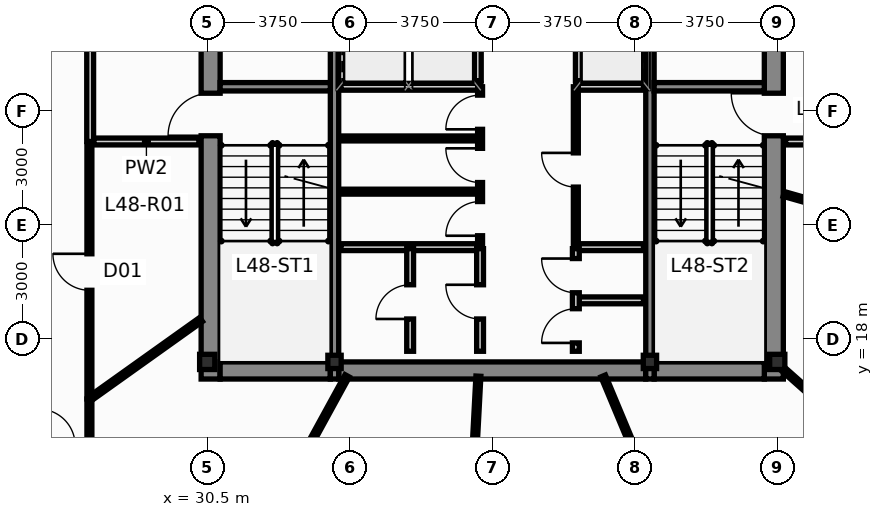
"""IFC4 building model, lengths in metres.
Left out: names, types, materials, properties, quantities, classifications, styles, units other than length and angle.
Written with IfcOpenShell. Run it as: python <this file> out.ifc"""

import sys

from ifc_helpers import new_model, si_unit, direction, frame, frame_2d, origin, origin_2d, place, context, subcontext, project, spatial, rectangle, hollow_rectangle, i_section, extrude, source, transform, mapped, element, fill, save


model = new_model("IFC4")
c1 = context("Model", 3, precision=1e-05, world=origin(), true_north=direction((0.0, 1.0)))
c2 = subcontext(c1, "Body", "Model", "MODEL_VIEW")
j1 = project(units=[si_unit("LENGTHUNIT", "METRE"), si_unit("PLANEANGLEUNIT", "RADIAN")], contexts=[c1])
p1 = place(None, origin())
s1 = spatial("IfcSite", under=j1, at=p1, CompositionType="ELEMENT")
p2 = place(p1, origin())
s2 = spatial("IfcBuilding", under=s1, at=p2, CompositionType="ELEMENT")
p3 = place(p2, frame((0.0, 0.0, 184.05)))
s3 = spatial("IfcBuildingStorey", under=s2, at=p3, CompositionType="ELEMENT", Elevation=184.05)
m1 = source(origin(), c2, "Body", "SweptSolid", [
    extrude(i_section(OverallWidth=0.4, OverallDepth=0.4, WebThickness=0.02, FlangeThickness=0.032, at=origin_2d()), origin(), (0.0, 0.0, 1.0), 3.65),
])
for number, where, z_axis, x_axis in (
    (1, (30.5, 17.4, 0.0), (0.0, 0.0, 1.0), (1.0, 0.0, 0.0)),
    (2, (45.5, 17.4, 0.0), (0.0, 0.0, 1.0), (1.0, 0.0, 0.0)),
):
    element("IfcColumn", number, at=place(p3, frame(where, z_axis=z_axis, x_axis=x_axis)), inside=s3, PredefinedType="COLUMN", context=c2, shape_type="MappedRepresentation", body=[
        mapped(m1, transform((0.0, 0.0, 0.0), scale=1.0)),
    ])
m2 = source(origin(), c2, "Body", "SweptSolid", [
    extrude(hollow_rectangle(XDim=0.35, YDim=0.35, WallThickness=0.016, at=origin_2d()), origin(), (0.0, 0.0, 1.0), 3.65),
])
for number, where, z_axis, x_axis in (
    (3, (33.85, 17.4, 0.0), (0.0, 0.0, 1.0), (1.0, 0.0, 0.0)),
    (4, (42.15, 17.4, 0.0), (0.0, 0.0, 1.0), (1.0, 0.0, 0.0)),
):
    element("IfcColumn", number, at=place(p3, frame(where, z_axis=z_axis, x_axis=x_axis)), inside=s3, PredefinedType="COLUMN", context=c2, shape_type="MappedRepresentation", body=[
        mapped(m2, transform((0.0, 0.0, 0.0), scale=1.0)),
    ])
p4 = place(p3, frame((30.59, 16.95, 0.0), z_axis=(0.0, 0.0, 1.0), x_axis=(0.0, 1.0, 0.0)))
e5 = element("IfcWall", 5, at=p4, inside=s3, PredefinedType="SHEAR", context=c2, shape_type="SweptSolid", body=[
    extrude(rectangle(XDim=13.275, YDim=0.5, at=frame_2d((6.638, 0.0))), origin(), (0.0, 0.0, 1.0), 3.65),
])
p5 = place(p4, frame((6.4, 0.0, 0.0)))
e6 = element("IfcOpeningElement", 6, at=p5, cuts=e5, PredefinedType="OPENING", context=c2, shape_type="SweptSolid", body=[
    extrude(rectangle(XDim=1.12, YDim=2.15, at=frame_2d((0.56, 1.075))), frame((0.0, 0.262, 0.0), z_axis=(0.0, -1.0, 0.0), x_axis=(1.0, 0.0, 0.0)), (0.0, 0.0, 1.0), 0.524),
])
p6 = place(p4, frame((10.85, 0.0, 0.0)))
e7 = element("IfcOpeningElement", 7, at=p6, cuts=e5, PredefinedType="OPENING", context=c2, shape_type="SweptSolid", body=[
    extrude(rectangle(XDim=1.2, YDim=2.2, at=frame_2d((0.6, 1.1))), frame((0.0, 0.262, 0.0), z_axis=(0.0, -1.0, 0.0), x_axis=(1.0, 0.0, 0.0)), (0.0, 0.0, 1.0), 0.524),
])
p7 = place(p3, frame((45.41, 16.95, 0.0), z_axis=(0.0, 0.0, 1.0), x_axis=(0.0, 1.0, 0.0)))
e8 = element("IfcWall", 8, at=p7, inside=s3, PredefinedType="SHEAR", context=c2, shape_type="SweptSolid", body=[
    extrude(rectangle(XDim=13.275, YDim=0.5, at=frame_2d((6.638, 0.0))), origin(), (0.0, 0.0, 1.0), 3.65),
])
p8 = place(p7, frame((6.4, 0.0, 0.0)))
e9 = element("IfcOpeningElement", 9, at=p8, cuts=e8, PredefinedType="OPENING", context=c2, shape_type="SweptSolid", body=[
    extrude(rectangle(XDim=1.12, YDim=2.15, at=frame_2d((0.56, 1.075))), frame((0.0, 0.262, 0.0), z_axis=(0.0, -1.0, 0.0), x_axis=(1.0, 0.0, 0.0)), (0.0, 0.0, 1.0), 0.524),
])
p9 = place(p7, frame((10.85, 0.0, 0.0)))
e10 = element("IfcOpeningElement", 10, at=p9, cuts=e8, PredefinedType="OPENING", context=c2, shape_type="SweptSolid", body=[
    extrude(rectangle(XDim=1.2, YDim=2.2, at=frame_2d((0.6, 1.1))), frame((0.0, 0.262, 0.0), z_axis=(0.0, -1.0, 0.0), x_axis=(1.0, 0.0, 0.0)), (0.0, 0.0, 1.0), 0.524),
])
p10 = place(p3, frame((30.84, 17.175, 0.0), z_axis=(0.0, 0.0, 1.0), x_axis=(1.0, 0.0, 0.0)))
e11 = element("IfcWall", 11, at=p10, inside=s3, PredefinedType="SHEAR", context=c2, shape_type="SweptSolid", body=[
    extrude(rectangle(XDim=2.9, YDim=0.45, at=frame_2d((1.45, 0.0))), origin(), (0.0, 0.0, 1.0), 3.65),
])
p11 = place(p3, frame((33.96, 17.175, 0.0), z_axis=(0.0, 0.0, 1.0), x_axis=(1.0, 0.0, 0.0)))
e12 = element("IfcWall", 12, at=p11, inside=s3, PredefinedType="SHEAR", context=c2, shape_type="SweptSolid", body=[
    extrude(rectangle(XDim=8.08, YDim=0.45, at=frame_2d((4.04, 0.0))), origin(), (0.0, 0.0, 1.0), 3.65),
])
p12 = place(p3, frame((42.26, 17.175, 0.0), z_axis=(0.0, 0.0, 1.0), x_axis=(1.0, 0.0, 0.0)))
e13 = element("IfcWall", 13, at=p12, inside=s3, PredefinedType="SHEAR", context=c2, shape_type="SweptSolid", body=[
    extrude(rectangle(XDim=2.9, YDim=0.45, at=frame_2d((1.45, 0.0))), origin(), (0.0, 0.0, 1.0), 3.65),
])
for number, where, z_axis, x_axis in (
    (14, (33.85, 16.95, 0.0), (0.0, 0.0, 1.0), (0.0, 1.0, 0.0)),
    (15, (42.15, 16.95, 0.0), (0.0, 0.0, 1.0), (0.0, 1.0, 0.0)),
):
    element("IfcWall", number, at=place(p3, frame(where, z_axis=z_axis, x_axis=x_axis)), inside=s3, PredefinedType="SHEAR", context=c2, shape_type="SweptSolid", body=[
        extrude(rectangle(XDim=13.275, YDim=0.22, at=frame_2d((6.638, 0.0))), origin(), (0.0, 0.0, 1.0), 3.65),
    ])
for number, where, z_axis, x_axis in (
    (16, (30.84, 24.64, 0.0), (0.0, 0.0, 1.0), (1.0, 0.0, 0.0)),
    (17, (42.26, 24.64, 0.0), (0.0, 0.0, 1.0), (1.0, 0.0, 0.0)),
):
    element("IfcWall", number, at=place(p3, frame(where, z_axis=z_axis, x_axis=x_axis)), inside=s3, PredefinedType="SHEAR", context=c2, shape_type="SweptSolid", body=[
        extrude(rectangle(XDim=2.9, YDim=0.22, at=frame_2d((1.45, 0.0))), origin(), (0.0, 0.0, 1.0), 3.65),
    ])
for number, where, z_axis, x_axis in (
    (18, (37.62, 24.8, 0.0), (0.0, 0.0, 1.0), (0.0, 1.0, 0.0)),
    (19, (40.28, 24.8, 0.0), (0.0, 0.0, 1.0), (0.0, 1.0, 0.0)),
):
    element("IfcWall", number, at=place(p3, frame(where, z_axis=z_axis, x_axis=x_axis)), inside=s3, PredefinedType="PARTITIONING", context=c2, shape_type="SweptSolid", body=[
        extrude(rectangle(XDim=2.0, YDim=0.18, at=frame_2d((1.0, 0.0))), origin(), (0.0, 0.0, 1.0), 3.4),
    ])
p13 = place(p3, frame((34.02, 24.64, 0.0), z_axis=(0.0, 0.0, 1.0), x_axis=(1.0, 0.0, 0.0)))
e20 = element("IfcWall", 20, at=p13, inside=s3, PredefinedType="PARTITIONING", context=c2, shape_type="SweptSolid", body=[
    extrude(rectangle(XDim=3.68, YDim=0.18, at=frame_2d((1.84, 0.0))), origin(), (0.0, 0.0, 1.0), 3.4),
])
p14 = place(p3, frame((40.2, 24.64, 0.0), z_axis=(0.0, 0.0, 1.0), x_axis=(1.0, 0.0, 0.0)))
e21 = element("IfcWall", 21, at=p14, inside=s3, PredefinedType="PARTITIONING", context=c2, shape_type="SweptSolid", body=[
    extrude(rectangle(XDim=1.78, YDim=0.18, at=frame_2d((0.89, 0.0))), origin(), (0.0, 0.0, 1.0), 3.4),
])
p15 = place(p3, frame((27.42, 23.2, 0.0), z_axis=(0.0, 0.0, 1.0), x_axis=(0.0, 1.0, 0.0)))
e22 = element("IfcWall", 22, at=p15, inside=s3, PredefinedType="PARTITIONING", context=c2, shape_type="SweptSolid", body=[
    extrude(rectangle(XDim=6.4, YDim=0.18, at=frame_2d((3.2, 0.0))), origin(), (0.0, 0.0, 1.0), 3.078),
])
p16 = place(p15, frame((2.65, 0.0, 0.0)))
e23 = element("IfcOpeningElement", 23, at=p16, cuts=e22, PredefinedType="OPENING", context=c2, shape_type="SweptSolid", body=[
    extrude(rectangle(XDim=1.05, YDim=2.15, at=frame_2d((0.525, 1.075))), frame((0.0, 0.102, 0.0), z_axis=(0.0, -1.0, 0.0), x_axis=(1.0, 0.0, 0.0)), (0.0, 0.0, 1.0), 0.204),
])
for number, where, z_axis, x_axis in (
    (24, (27.52, 23.2, 0.0), (0.0, 0.0, 1.0), (1.0, 0.0, 0.0)),
    (25, (45.72, 23.2, 0.0), (0.0, 0.0, 1.0), (1.0, 0.0, 0.0)),
):
    element("IfcWall", number, at=place(p3, frame(where, z_axis=z_axis, x_axis=x_axis)), inside=s3, PredefinedType="PARTITIONING", context=c2, shape_type="SweptSolid", body=[
        extrude(rectangle(XDim=2.76, YDim=0.18, at=frame_2d((1.38, 0.0))), origin(), (0.0, 0.0, 1.0), 3.4),
    ])
p17 = place(p3, frame((34.02, 20.42, 0.0), z_axis=(0.0, 0.0, 1.0), x_axis=(1.0, 0.0, 0.0)))
e26 = element("IfcWall", 26, at=p17, inside=s3, PredefinedType="PARTITIONING", context=c2, shape_type="SweptSolid", body=[
    extrude(rectangle(XDim=3.64, YDim=0.18, at=frame_2d((1.82, 0.0))), origin(), (0.0, 0.0, 1.0), 3.4),
])
p18 = place(p3, frame((40.22, 20.42, 0.0), z_axis=(0.0, 0.0, 1.0), x_axis=(1.0, 0.0, 0.0)))
e27 = element("IfcWall", 27, at=p18, inside=s3, PredefinedType="PARTITIONING", context=c2, shape_type="SweptSolid", body=[
    extrude(rectangle(XDim=1.76, YDim=0.18, at=frame_2d((0.88, 0.0))), origin(), (0.0, 0.0, 1.0), 3.4),
])
for number, where, z_axis, x_axis in (
    (28, (34.02, 21.88, 0.0), (0.0, 0.0, 1.0), (1.0, 0.0, 0.0)),
    (29, (34.02, 23.28, 0.0), (0.0, 0.0, 1.0), (1.0, 0.0, 0.0)),
):
    element("IfcWall", number, at=place(p3, frame(where, z_axis=z_axis, x_axis=x_axis)), inside=s3, PredefinedType="PARTITIONING", context=c2, shape_type="SweptSolid", body=[
        extrude(rectangle(XDim=3.58, YDim=0.13, at=frame_2d((1.79, 0.0))), origin(), (0.0, 0.0, 1.0), 3.4),
    ])
p19 = place(p3, frame((37.68, 20.5, 0.0), z_axis=(0.0, 0.0, 1.0), x_axis=(0.0, 1.0, 0.0)))
e30 = element("IfcWall", 30, at=p19, inside=s3, PredefinedType="PARTITIONING", context=c2, shape_type="SweptSolid", body=[
    extrude(rectangle(XDim=4.14, YDim=0.13, at=frame_2d((2.07, 0.0))), origin(), (0.0, 0.0, 1.0), 3.4),
])
p20 = place(p19, frame((0.22, 0.0, 0.0)))
e31 = element("IfcOpeningElement", 31, at=p20, cuts=e30, PredefinedType="OPENING", context=c2, shape_type="SweptSolid", body=[
    extrude(rectangle(XDim=0.9, YDim=2.1, at=frame_2d((0.45, 1.05))), frame((0.0, 0.077, 0.0), z_axis=(0.0, -1.0, 0.0), x_axis=(1.0, 0.0, 0.0)), (0.0, 0.0, 1.0), 0.154),
])
p21 = place(p19, frame((1.62, 0.0, 0.0)))
e32 = element("IfcOpeningElement", 32, at=p21, cuts=e30, PredefinedType="OPENING", context=c2, shape_type="SweptSolid", body=[
    extrude(rectangle(XDim=0.9, YDim=2.1, at=frame_2d((0.45, 1.05))), frame((0.0, 0.077, 0.0), z_axis=(0.0, -1.0, 0.0), x_axis=(1.0, 0.0, 0.0)), (0.0, 0.0, 1.0), 0.154),
])
p22 = place(p19, frame((3.02, 0.0, 0.0)))
e33 = element("IfcOpeningElement", 33, at=p22, cuts=e30, PredefinedType="OPENING", context=c2, shape_type="SweptSolid", body=[
    extrude(rectangle(XDim=0.9, YDim=2.1, at=frame_2d((0.45, 1.05))), frame((0.0, 0.077, 0.0), z_axis=(0.0, -1.0, 0.0), x_axis=(1.0, 0.0, 0.0)), (0.0, 0.0, 1.0), 0.154),
])
p23 = place(p3, frame((40.2, 20.5, 0.0), z_axis=(0.0, 0.0, 1.0), x_axis=(0.0, 1.0, 0.0)))
e34 = element("IfcWall", 34, at=p23, inside=s3, PredefinedType="PARTITIONING", context=c2, shape_type="SweptSolid", body=[
    extrude(rectangle(XDim=4.14, YDim=0.13, at=frame_2d((2.07, 0.0))), origin(), (0.0, 0.0, 1.0), 3.4),
])
p24 = place(p23, frame((1.5, 0.0, 0.0)))
e35 = element("IfcOpeningElement", 35, at=p24, cuts=e34, PredefinedType="OPENING", context=c2, shape_type="SweptSolid", body=[
    extrude(rectangle(XDim=0.9, YDim=2.1, at=frame_2d((0.45, 1.05))), frame((0.0, 0.077, 0.0), z_axis=(0.0, -1.0, 0.0), x_axis=(1.0, 0.0, 0.0)), (0.0, 0.0, 1.0), 0.154),
])
p25 = place(p3, frame((35.84, 17.68, 0.0), z_axis=(0.0, 0.0, 1.0), x_axis=(0.0, 1.0, 0.0)))
e36 = element("IfcWall", 36, at=p25, inside=s3, PredefinedType="PARTITIONING", context=c2, shape_type="SweptSolid", body=[
    extrude(rectangle(XDim=2.7, YDim=0.18, at=frame_2d((1.35, 0.0))), origin(), (0.0, 0.0, 1.0), 3.4),
])
p26 = place(p25, frame((0.85, 0.0, 0.0)))
e37 = element("IfcOpeningElement", 37, at=p26, cuts=e36, PredefinedType="OPENING", context=c2, shape_type="SweptSolid", body=[
    extrude(rectangle(XDim=0.9, YDim=2.1, at=frame_2d((0.45, 1.05))), frame((0.0, 0.102, 0.0), z_axis=(0.0, -1.0, 0.0), x_axis=(1.0, 0.0, 0.0)), (0.0, 0.0, 1.0), 0.204),
])
p27 = place(p3, frame((37.68, 17.68, 0.0), z_axis=(0.0, 0.0, 1.0), x_axis=(0.0, 1.0, 0.0)))
e38 = element("IfcWall", 38, at=p27, inside=s3, PredefinedType="PARTITIONING", context=c2, shape_type="SweptSolid", body=[
    extrude(rectangle(XDim=2.7, YDim=0.18, at=frame_2d((1.35, 0.0))), origin(), (0.0, 0.0, 1.0), 3.4),
])
p28 = place(p27, frame((0.85, 0.0, 0.0)))
e39 = element("IfcOpeningElement", 39, at=p28, cuts=e38, PredefinedType="OPENING", context=c2, shape_type="SweptSolid", body=[
    extrude(rectangle(XDim=0.9, YDim=2.1, at=frame_2d((0.45, 1.05))), frame((0.0, 0.102, 0.0), z_axis=(0.0, -1.0, 0.0), x_axis=(1.0, 0.0, 0.0)), (0.0, 0.0, 1.0), 0.204),
])
p29 = place(p3, frame((40.28, 19.02, 0.0), z_axis=(0.0, 0.0, 1.0), x_axis=(1.0, 0.0, 0.0)))
e40 = element("IfcWall", 40, at=p29, inside=s3, PredefinedType="PARTITIONING", context=c2, shape_type="SweptSolid", body=[
    extrude(rectangle(XDim=1.7, YDim=0.18, at=frame_2d((0.85, 0.0))), origin(), (0.0, 0.0, 1.0), 3.4),
])
p30 = place(p3, frame((40.2, 17.68, 0.0), z_axis=(0.0, 0.0, 1.0), x_axis=(0.0, 1.0, 0.0)))
e41 = element("IfcWall", 41, at=p30, inside=s3, PredefinedType="PARTITIONING", context=c2, shape_type="SweptSolid", body=[
    extrude(rectangle(XDim=2.7, YDim=0.18, at=frame_2d((1.35, 0.0))), origin(), (0.0, 0.0, 1.0), 3.4),
])
p31 = place(p30, frame((0.22, 0.0, 0.0)))
e42 = element("IfcOpeningElement", 42, at=p31, cuts=e41, PredefinedType="OPENING", context=c2, shape_type="SweptSolid", body=[
    extrude(rectangle(XDim=0.9, YDim=2.1, at=frame_2d((0.45, 1.05))), frame((0.0, 0.102, 0.0), z_axis=(0.0, -1.0, 0.0), x_axis=(1.0, 0.0, 0.0)), (0.0, 0.0, 1.0), 0.204),
])
p32 = place(p30, frame((1.54, 0.0, 0.0)))
e43 = element("IfcOpeningElement", 43, at=p32, cuts=e41, PredefinedType="OPENING", context=c2, shape_type="SweptSolid", body=[
    extrude(rectangle(XDim=0.9, YDim=2.1, at=frame_2d((0.45, 1.05))), frame((0.0, 0.102, 0.0), z_axis=(0.0, -1.0, 0.0), x_axis=(1.0, 0.0, 0.0)), (0.0, 0.0, 1.0), 0.204),
])
p33 = place(p3, frame((45.672, 21.819, 0.0), z_axis=(0.0, 0.0, 1.0), x_axis=(0.961904046383, -0.273387281254, 0.0)))
e44 = element("IfcWall", 44, at=p33, inside=s3, PredefinedType="PARTITIONING", context=c2, shape_type="SweptSolid", body=[
    extrude(rectangle(XDim=15.958, YDim=0.13, at=frame_2d((7.979, 0.0))), origin(), (0.0, 0.0, 1.0), 2.925),
])
p34 = place(p33, frame((7.565, 0.0, 0.0)))
e45 = element("IfcOpeningElement", 45, at=p34, cuts=e44, PredefinedType="OPENING", context=c2, shape_type="SweptSolid", body=[
    extrude(rectangle(XDim=0.96, YDim=2.15, at=frame_2d((0.48, 1.075))), frame((0.0, 0.077, 0.0), z_axis=(0.0, -1.0, 0.0), x_axis=(1.0, 0.0, 0.0)), (0.0, 0.0, 1.0), 0.154),
])
p35 = place(p3, frame((45.656, 17.21, 0.0), z_axis=(0.0, 0.0, 1.0), x_axis=(0.748005792128, -0.663692198947, 0.0)))
e46 = element("IfcWall", 46, at=p35, inside=s3, PredefinedType="PARTITIONING", context=c2, shape_type="SweptSolid", body=[
    extrude(rectangle(XDim=14.965, YDim=0.13, at=frame_2d((7.482, 0.0))), origin(), (0.0, 0.0, 1.0), 2.925),
])
p36 = place(p3, frame((28.57, 6.781, 0.0), z_axis=(0.0, 0.0, 1.0), x_axis=(0.480287077474, 0.877111351661, 0.0)))
e47 = element("IfcWall", 47, at=p36, inside=s3, PredefinedType="PARTITIONING", context=c2, shape_type="SweptSolid", body=[
    extrude(rectangle(XDim=11.689, YDim=0.13, at=frame_2d((5.844, 0.0))), origin(), (0.0, 0.0, 1.0), 3.4),
])
p37 = place(p36, frame((5.417, 0.0, 0.0)))
e48 = element("IfcOpeningElement", 48, at=p37, cuts=e47, PredefinedType="OPENING", context=c2, shape_type="SweptSolid", body=[
    extrude(rectangle(XDim=0.96, YDim=2.15, at=frame_2d((0.48, 1.075))), frame((0.0, 0.077, 0.0), z_axis=(0.0, -1.0, 0.0), x_axis=(1.0, 0.0, 0.0)), (0.0, 0.0, 1.0), 0.154),
])
p38 = place(p3, frame((40.919, 17.031, 0.0), z_axis=(0.0, 0.0, 1.0), x_axis=(0.385638121212, -0.922650117579, 0.0)))
e49 = element("IfcWall", 49, at=p38, inside=s3, PredefinedType="PARTITIONING", context=c2, shape_type="SweptSolid", body=[
    extrude(rectangle(XDim=10.795, YDim=0.13, at=frame_2d((5.397, 0.0))), origin(), (0.0, 0.0, 1.0), 3.4),
])
p39 = place(p38, frame((4.967, 0.0, 0.0)))
e50 = element("IfcOpeningElement", 50, at=p39, cuts=e49, PredefinedType="OPENING", context=c2, shape_type="SweptSolid", body=[
    extrude(rectangle(XDim=0.96, YDim=2.15, at=frame_2d((0.48, 1.075))), frame((0.0, 0.077, 0.0), z_axis=(0.0, -1.0, 0.0), x_axis=(1.0, 0.0, 0.0)), (0.0, 0.0, 1.0), 0.154),
])
p40 = place(p3, frame((37.105, 6.931, 0.0), z_axis=(0.0, 0.0, 1.0), x_axis=(0.052560100898, 0.998617762607, 0.0)))
e51 = element("IfcWall", 51, at=p40, inside=s3, PredefinedType="PARTITIONING", context=c2, shape_type="SweptSolid", body=[
    extrude(rectangle(XDim=10.107, YDim=0.13, at=frame_2d((5.054, 0.0))), origin(), (0.0, 0.0, 1.0), 3.4),
])
p41 = place(p40, frame((4.62, 0.0, 0.0)))
e52 = element("IfcOpeningElement", 52, at=p41, cuts=e51, PredefinedType="OPENING", context=c2, shape_type="SweptSolid", body=[
    extrude(rectangle(XDim=0.96, YDim=2.15, at=frame_2d((0.48, 1.075))), frame((0.0, 0.077, 0.0), z_axis=(0.0, -1.0, 0.0), x_axis=(1.0, 0.0, 0.0)), (0.0, 0.0, 1.0), 0.154),
])
p42 = place(p3, frame((27.4, 16.425, 0.0), z_axis=(0.0, 0.0, 1.0), x_axis=(0.0, 1.0, 0.0)))
e53 = element("IfcWall", 53, at=p42, inside=s3, PredefinedType="PARTITIONING", context=c2, shape_type="SweptSolid", body=[
    extrude(rectangle(XDim=6.68, YDim=0.13, at=frame_2d((3.34, 0.0))), origin(), (0.0, 0.0, 1.0), 3.4),
])
p43 = place(p42, frame((2.86, 0.0, 0.0)))
e54 = element("IfcOpeningElement", 54, at=p43, cuts=e53, PredefinedType="OPENING", context=c2, shape_type="SweptSolid", body=[
    extrude(rectangle(XDim=0.96, YDim=2.15, at=frame_2d((0.48, 1.075))), frame((0.0, 0.077, 0.0), z_axis=(0.0, -1.0, 0.0), x_axis=(1.0, 0.0, 0.0)), (0.0, 0.0, 1.0), 0.154),
])
p44 = place(p3, frame((27.404, 16.423, 0.0), z_axis=(0.0, 0.0, 1.0), x_axis=(0.81418624732, 0.580603784585, 0.0)))
e55 = element("IfcWall", 55, at=p44, inside=s3, PredefinedType="PARTITIONING", context=c2, shape_type="SweptSolid", body=[
    extrude(rectangle(XDim=3.605, YDim=0.13, at=frame_2d((1.802, 0.0))), origin(), (0.0, 0.0, 1.0), 3.4),
])
p45 = place(p3, frame((27.4, 15.205, 0.0), z_axis=(0.0, 0.0, 1.0), x_axis=(0.0, 1.0, 0.0)))
e56 = element("IfcWall", 56, at=p45, inside=s3, PredefinedType="PARTITIONING", context=c2, shape_type="SweptSolid", body=[
    extrude(rectangle(XDim=1.21, YDim=0.13, at=frame_2d((0.605, 0.0))), origin(), (0.0, 0.0, 1.0), 3.4),
])
p46 = place(p5, origin())
e57 = element("IfcDoor", 57, at=p46, inside=s3, OperationType="SINGLE_SWING_LEFT", PredefinedType="DOOR", context=c2, shape_type="SweptSolid", body=[
    extrude(rectangle(XDim=1.12, YDim=2.15, at=frame_2d((0.56, 1.075))), frame((0.0, 0.025, 0.0), z_axis=(0.0, -1.0, 0.0), x_axis=(1.0, 0.0, 0.0)), (0.0, 0.0, 1.0), 0.05),
])
fill(e6, e57)
p47 = place(p8, origin())
e58 = element("IfcDoor", 58, at=p47, inside=s3, OperationType="SINGLE_SWING_RIGHT", PredefinedType="DOOR", context=c2, shape_type="SweptSolid", body=[
    extrude(rectangle(XDim=1.12, YDim=2.15, at=frame_2d((0.56, 1.075))), frame((0.0, 0.025, 0.0), z_axis=(0.0, -1.0, 0.0), x_axis=(1.0, 0.0, 0.0)), (0.0, 0.0, 1.0), 0.05),
])
fill(e9, e58)
p48 = place(p20, origin())
e59 = element("IfcDoor", 59, at=p48, inside=s3, OperationType="SINGLE_SWING_LEFT", PredefinedType="DOOR", context=c2, shape_type="SweptSolid", body=[
    extrude(rectangle(XDim=0.9, YDim=2.1, at=frame_2d((0.45, 1.05))), frame((0.0, 0.025, 0.0), z_axis=(0.0, -1.0, 0.0), x_axis=(1.0, 0.0, 0.0)), (0.0, 0.0, 1.0), 0.05),
])
fill(e31, e59)
p49 = place(p21, origin())
e60 = element("IfcDoor", 60, at=p49, inside=s3, OperationType="SINGLE_SWING_RIGHT", PredefinedType="DOOR", context=c2, shape_type="SweptSolid", body=[
    extrude(rectangle(XDim=0.9, YDim=2.1, at=frame_2d((0.45, 1.05))), frame((0.0, 0.025, 0.0), z_axis=(0.0, -1.0, 0.0), x_axis=(1.0, 0.0, 0.0)), (0.0, 0.0, 1.0), 0.05),
])
fill(e32, e60)
p50 = place(p22, origin())
e61 = element("IfcDoor", 61, at=p50, inside=s3, OperationType="SINGLE_SWING_LEFT", PredefinedType="DOOR", context=c2, shape_type="SweptSolid", body=[
    extrude(rectangle(XDim=0.9, YDim=2.1, at=frame_2d((0.45, 1.05))), frame((0.0, 0.025, 0.0), z_axis=(0.0, -1.0, 0.0), x_axis=(1.0, 0.0, 0.0)), (0.0, 0.0, 1.0), 0.05),
])
fill(e33, e61)
p51 = place(p24, origin())
e62 = element("IfcDoor", 62, at=p51, inside=s3, OperationType="SINGLE_SWING_RIGHT", PredefinedType="DOOR", context=c2, shape_type="SweptSolid", body=[
    extrude(rectangle(XDim=0.9, YDim=2.1, at=frame_2d((0.45, 1.05))), frame((0.0, 0.025, 0.0), z_axis=(0.0, -1.0, 0.0), x_axis=(1.0, 0.0, 0.0)), (0.0, 0.0, 1.0), 0.05),
])
fill(e35, e62)
p52 = place(p26, origin())
e63 = element("IfcDoor", 63, at=p52, inside=s3, OperationType="SINGLE_SWING_LEFT", PredefinedType="DOOR", context=c2, shape_type="SweptSolid", body=[
    extrude(rectangle(XDim=0.9, YDim=2.1, at=frame_2d((0.45, 1.05))), frame((0.0, 0.025, 0.0), z_axis=(0.0, -1.0, 0.0), x_axis=(1.0, 0.0, 0.0)), (0.0, 0.0, 1.0), 0.05),
])
fill(e37, e63)
p53 = place(p28, origin())
e64 = element("IfcDoor", 64, at=p53, inside=s3, OperationType="SINGLE_SWING_RIGHT", PredefinedType="DOOR", context=c2, shape_type="SweptSolid", body=[
    extrude(rectangle(XDim=0.9, YDim=2.1, at=frame_2d((0.45, 1.05))), frame((0.0, 0.025, 0.0), z_axis=(0.0, -1.0, 0.0), x_axis=(1.0, 0.0, 0.0)), (0.0, 0.0, 1.0), 0.05),
])
fill(e39, e64)
p54 = place(p31, origin())
e65 = element("IfcDoor", 65, at=p54, inside=s3, OperationType="SINGLE_SWING_LEFT", PredefinedType="DOOR", context=c2, shape_type="SweptSolid", body=[
    extrude(rectangle(XDim=0.9, YDim=2.1, at=frame_2d((0.45, 1.05))), frame((0.0, 0.025, 0.0), z_axis=(0.0, -1.0, 0.0), x_axis=(1.0, 0.0, 0.0)), (0.0, 0.0, 1.0), 0.05),
])
fill(e42, e65)
p55 = place(p32, origin())
e66 = element("IfcDoor", 66, at=p55, inside=s3, OperationType="SINGLE_SWING_RIGHT", PredefinedType="DOOR", context=c2, shape_type="SweptSolid", body=[
    extrude(rectangle(XDim=0.9, YDim=2.1, at=frame_2d((0.45, 1.05))), frame((0.0, 0.025, 0.0), z_axis=(0.0, -1.0, 0.0), x_axis=(1.0, 0.0, 0.0)), (0.0, 0.0, 1.0), 0.05),
])
fill(e43, e66)
p56 = place(p43, origin())
e67 = element("IfcDoor", 67, at=p56, inside=s3, OperationType="SINGLE_SWING_RIGHT", PredefinedType="DOOR", context=c2, shape_type="SweptSolid", body=[
    extrude(rectangle(XDim=0.96, YDim=2.15, at=frame_2d((0.48, 1.075))), frame((0.0, 0.025, 0.0), z_axis=(0.0, -1.0, 0.0), x_axis=(1.0, 0.0, 0.0)), (0.0, 0.0, 1.0), 0.05),
])
fill(e54, e67)
save(model, sys.argv[1])
